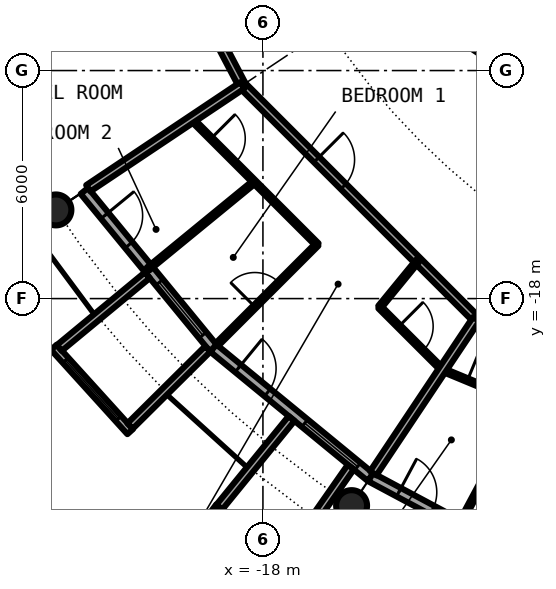
"""IFC4 building model, lengths in metres.
Left out: names, types, materials, properties, quantities, classifications, styles, units other than length and angle.
Written with IfcOpenShell. Run it as: python <this file> out.ifc"""

import sys

from ifc_helpers import new_model, si_unit, direction, frame, frame_2d, origin, origin_2d, place, context, subcontext, project, spatial, rectangle, circle, hollow_circle, extrude, element, fill, save


model = new_model("IFC4")
c1 = context("Model", 3, precision=1e-05, world=origin(), true_north=direction((0.0, 1.0)))
c2 = subcontext(c1, "Body", "Model", "MODEL_VIEW")
j1 = project(units=[si_unit("LENGTHUNIT", "METRE"), si_unit("PLANEANGLEUNIT", "RADIAN")], contexts=[c1])
p1 = place(None, origin())
s1 = spatial("IfcSite", under=j1, at=p1, CompositionType="ELEMENT")
p2 = place(p1, origin())
s2 = spatial("IfcBuilding", under=s1, at=p2, CompositionType="ELEMENT")
p3 = place(p2, frame((0.0, 0.0, 212.7)))
s3 = spatial("IfcBuildingStorey", under=s2, at=p3, CompositionType="ELEMENT", Elevation=212.7)
for number, where, z_axis, x_axis in (
    (1, (-23.448, -15.667, 0.0), (0.0, 0.0, 1.0), (1.0, 0.0, 0.0)),
    (2, (-15.667, -23.448, 0.0), (0.0, 0.0, 1.0), (1.0, 0.0, 0.0)),
):
    element("IfcColumn", number, at=place(p3, frame(where, z_axis=z_axis, x_axis=x_axis)), inside=s3, PredefinedType="COLUMN", context=c2, shape_type="SweptSolid", body=[
        extrude(hollow_circle(Radius=0.406, WallThickness=0.03, at=origin_2d()), origin(), (0.0, 0.0, 1.0), 3.05),
    ])
p4 = place(p3, frame((-22.699, -15.167, 0.0), z_axis=(0.0, 0.0, 1.0), x_axis=(0.634382322723, -0.773019449054, 0.0)))
e3 = element("IfcWall", 3, at=p4, inside=s3, PredefinedType="SOLIDWALL", context=c2, shape_type="SweptSolid", body=[
    extrude(rectangle(XDim=5.352, YDim=0.25, at=frame_2d((2.676, 0.0))), origin(), (0.0, 0.0, 1.0), 2.7),
])
p5 = place(p4, frame((0.841, 0.0, 0.0)))
e4 = element("IfcOpeningElement", 4, at=p5, cuts=e3, PredefinedType="OPENING", context=c2, shape_type="SweptSolid", body=[
    extrude(rectangle(XDim=1.0, YDim=2.2, at=frame_2d((0.5, 1.1))), frame((0.0, 0.135, 0.0), z_axis=(0.0, -1.0, 0.0), x_axis=(1.0, 0.0, 0.0)), (0.0, 0.0, 1.0), 0.27),
])
p6 = place(p4, frame((3.111, 0.0, 0.3)))
e5 = element("IfcOpeningElement", 5, at=p6, cuts=e3, PredefinedType="OPENING", context=c2, shape_type="SweptSolid", body=[
    extrude(rectangle(XDim=1.8, YDim=2.1, at=frame_2d((0.9, 1.05))), frame((0.0, 0.135, 0.0), z_axis=(0.0, -1.0, 0.0), x_axis=(1.0, 0.0, 0.0)), (0.0, 0.0, 1.0), 0.27),
])
p7 = place(p3, frame((-23.503, -19.282, -0.03), z_axis=(0.0, 0.0, 1.0), x_axis=(0.671506829416, -0.740998365753, 0.0)))
e6 = element("IfcWall", 6, at=p7, inside=s3, PredefinedType="SOLIDWALL", context=c2, shape_type="SweptSolid", body=[
    extrude(rectangle(XDim=2.993, YDim=0.2, at=frame_2d((1.497, 0.0))), origin(), (0.0, 0.0, 1.0), 2.73),
])
p8 = place(p7, frame((0.457, 0.0, 0.33)))
e7 = element("IfcOpeningElement", 7, at=p8, cuts=e6, PredefinedType="OPENING", context=c2, shape_type="SweptSolid", body=[
    extrude(circle(Radius=1.04, at=frame_2d((1.04, 1.04))), frame((0.0, 0.11, 0.0), z_axis=(0.0, -1.0, 0.0), x_axis=(1.0, 0.0, 0.0)), (0.0, 0.0, 1.0), 0.22),
])
p9 = place(p3, frame((-21.041, -17.384, -0.03), z_axis=(0.0, 0.0, 1.0), x_axis=(-0.770784861449, -0.63709551667, 0.0)))
e8 = element("IfcWall", 8, at=p9, inside=s3, PredefinedType="SOLIDWALL", context=c2, shape_type="SweptSolid", body=[
    extrude(rectangle(XDim=3.006, YDim=0.2, at=frame_2d((1.503, 0.0))), origin(), (0.0, 0.0, 1.0), 2.73),
])
p10 = place(p3, frame((-19.45, -19.323, -0.03), z_axis=(0.0, 0.0, 1.0), x_axis=(-0.709727076896, -0.704476739375, 0.0)))
e9 = element("IfcWall", 9, at=p10, inside=s3, PredefinedType="SOLIDWALL", context=c2, shape_type="SweptSolid", body=[
    extrude(rectangle(XDim=2.883, YDim=0.2, at=frame_2d((1.441, 0.0))), origin(), (0.0, 0.0, 1.0), 2.73),
])
p11 = place(p3, frame((-19.304, -19.304, 0.0), z_axis=(0.0, 0.0, 1.0), x_axis=(0.773019449054, -0.634382322723, 0.0)))
e10 = element("IfcWall", 10, at=p11, inside=s3, PredefinedType="SOLIDWALL", context=c2, shape_type="SweptSolid", body=[
    extrude(rectangle(XDim=5.352, YDim=0.25, at=frame_2d((2.676, 0.0))), origin(), (0.0, 0.0, 1.0), 2.7),
])
p12 = place(p11, frame((0.841, 0.0, 0.0)))
e11 = element("IfcOpeningElement", 11, at=p12, cuts=e10, PredefinedType="OPENING", context=c2, shape_type="SweptSolid", body=[
    extrude(rectangle(XDim=1.0, YDim=2.2, at=frame_2d((0.5, 1.1))), frame((0.0, 0.135, 0.0), z_axis=(0.0, -1.0, 0.0), x_axis=(1.0, 0.0, 0.0)), (0.0, 0.0, 1.0), 0.27),
])
p13 = place(p11, frame((3.111, 0.0, 0.3)))
e12 = element("IfcOpeningElement", 12, at=p13, cuts=e10, PredefinedType="OPENING", context=c2, shape_type="SweptSolid", body=[
    extrude(rectangle(XDim=1.8, YDim=2.1, at=frame_2d((0.9, 1.05))), frame((0.0, 0.135, 0.0), z_axis=(0.0, -1.0, 0.0), x_axis=(1.0, 0.0, 0.0)), (0.0, 0.0, 1.0), 0.27),
])
p14 = place(p3, frame((-19.289, -23.497, -0.03), z_axis=(0.0, 0.0, 1.0), x_axis=(0.797887588059, -0.602806268067, 0.0)))
e13 = element("IfcWall", 13, at=p14, inside=s3, PredefinedType="SOLIDWALL", context=c2, shape_type="SweptSolid", body=[
    extrude(rectangle(XDim=2.447, YDim=0.2, at=frame_2d((1.223, 0.0))), origin(), (0.0, 0.0, 1.0), 2.73),
])
p15 = place(p14, frame((0.183, 0.0, 0.33)))
e14 = element("IfcOpeningElement", 14, at=p15, cuts=e13, PredefinedType="OPENING", context=c2, shape_type="SweptSolid", body=[
    extrude(circle(Radius=1.04, at=frame_2d((1.04, 1.04))), frame((0.0, 0.11, 0.0), z_axis=(0.0, -1.0, 0.0), x_axis=(1.0, 0.0, 0.0)), (0.0, 0.0, 1.0), 0.22),
])
p16 = place(p3, frame((-17.246, -21.155, -0.03), z_axis=(0.0, 0.0, 1.0), x_axis=(-0.631741648902, -0.775179004516, 0.0)))
e15 = element("IfcWall", 15, at=p16, inside=s3, PredefinedType="SOLIDWALL", context=c2, shape_type="SweptSolid", body=[
    extrude(rectangle(XDim=3.006, YDim=0.2, at=frame_2d((1.503, 0.0))), origin(), (0.0, 0.0, 1.0), 2.73),
])
p17 = place(p3, frame((-15.688, -22.433, -0.03), z_axis=(0.0, 0.0, 1.0), x_axis=(-0.573260687834, -0.819373043115, 0.0)))
e16 = element("IfcWall", 16, at=p17, inside=s3, PredefinedType="SOLIDWALL", context=c2, shape_type="SweptSolid", body=[
    extrude(rectangle(XDim=2.925, YDim=0.2, at=frame_2d((1.463, 0.0))), origin(), (0.0, 0.0, 1.0), 2.73),
])
p18 = place(p3, frame((-15.167, -22.699, 0.0), z_axis=(0.0, 0.0, 1.0), x_axis=(0.881915646801, -0.471407246368, 0.0)))
e17 = element("IfcWall", 17, at=p18, inside=s3, PredefinedType="SOLIDWALL", context=c2, shape_type="SweptSolid", body=[
    extrude(rectangle(XDim=5.352, YDim=0.25, at=frame_2d((2.676, 0.0))), origin(), (0.0, 0.0, 1.0), 2.7),
])
p19 = place(p18, frame((0.841, 0.0, 0.0)))
e18 = element("IfcOpeningElement", 18, at=p19, cuts=e17, PredefinedType="OPENING", context=c2, shape_type="SweptSolid", body=[
    extrude(rectangle(XDim=1.0, YDim=2.2, at=frame_2d((0.5, 1.1))), frame((0.0, 0.135, 0.0), z_axis=(0.0, -1.0, 0.0), x_axis=(1.0, 0.0, 0.0)), (0.0, 0.0, 1.0), 0.27),
])
p20 = place(p18, frame((3.111, 0.0, 0.3)))
e19 = element("IfcOpeningElement", 19, at=p20, cuts=e17, PredefinedType="OPENING", context=c2, shape_type="SweptSolid", body=[
    extrude(rectangle(XDim=1.8, YDim=2.1, at=frame_2d((0.9, 1.05))), frame((0.0, 0.135, 0.0), z_axis=(0.0, -1.0, 0.0), x_axis=(1.0, 0.0, 0.0)), (0.0, 0.0, 1.0), 0.27),
])
p21 = place(p3, frame((-19.869, -13.285, 0.0), z_axis=(0.0, 0.0, 1.0), x_axis=(0.707290020325, -0.706923494552, 0.0)))
e20 = element("IfcWall", 20, at=p21, inside=s3, PredefinedType="PARTITIONING", context=c2, shape_type="SweptSolid", body=[
    extrude(rectangle(XDim=4.663, YDim=0.1, at=frame_2d((2.331, 0.0))), origin(), (0.0, 0.0, 1.0), 2.7),
])
p22 = place(p21, frame((0.712, 0.0, 0.0)))
e21 = element("IfcOpeningElement", 21, at=p22, cuts=e20, PredefinedType="OPENING", context=c2, shape_type="SweptSolid", body=[
    extrude(rectangle(XDim=0.9, YDim=2.3, at=frame_2d((0.45, 1.15))), frame((0.0, 0.06, 0.0), z_axis=(0.0, -1.0, 0.0), x_axis=(1.0, 0.0, 0.0)), (0.0, 0.0, 1.0), 0.12),
])
p23 = place(p3, frame((-14.927, -18.224, 0.0), z_axis=(0.0, 0.0, 1.0), x_axis=(0.707316201218, -0.706897299114, 0.0)))
e22 = element("IfcWall", 22, at=p23, inside=s3, PredefinedType="PARTITIONING", context=c2, shape_type="SweptSolid", body=[
    extrude(rectangle(XDim=2.331, YDim=0.1, at=frame_2d((1.166, 0.0))), origin(), (0.0, 0.0, 1.0), 2.7),
])
p24 = place(p23, frame((0.716, 0.0, 0.0)))
e23 = element("IfcOpeningElement", 23, at=p24, cuts=e22, PredefinedType="OPENING", context=c2, shape_type="SweptSolid", body=[
    extrude(rectangle(XDim=0.9, YDim=2.3, at=frame_2d((0.45, 1.15))), frame((0.0, 0.06, 0.0), z_axis=(0.0, -1.0, 0.0), x_axis=(1.0, 0.0, 0.0)), (0.0, 0.0, 1.0), 0.12),
])
p25 = place(p3, frame((-13.278, -19.873, 0.0), z_axis=(0.0, 0.0, 1.0), x_axis=(0.923920484476, -0.38258455061, 0.0)))
e24 = element("IfcWall", 24, at=p25, inside=s3, PredefinedType="PARTITIONING", context=c2, shape_type="SweptSolid", body=[
    extrude(rectangle(XDim=4.663, YDim=0.1, at=frame_2d((2.332, 0.0))), origin(), (0.0, 0.0, 1.0), 2.7),
])
p26 = place(p25, frame((0.715, 0.0, 0.0)))
e25 = element("IfcOpeningElement", 25, at=p26, cuts=e24, PredefinedType="OPENING", context=c2, shape_type="SweptSolid", body=[
    extrude(rectangle(XDim=0.9, YDim=2.3, at=frame_2d((0.45, 1.15))), frame((0.0, 0.06, 0.0), z_axis=(0.0, -1.0, 0.0), x_axis=(1.0, 0.0, 0.0)), (0.0, 0.0, 1.0), 0.12),
])
p27 = place(p3, frame((-19.317, -10.915, 0.0), z_axis=(0.0, 0.0, 1.0), x_axis=(0.465359652486, -0.885121683068, 0.0)))
e26 = element("IfcWall", 26, at=p27, inside=s3, PredefinedType="PARTITIONING", context=c2, shape_type="SweptSolid", body=[
    extrude(rectangle(XDim=1.665, YDim=0.2, at=frame_2d((0.833, 0.0))), origin(), (0.0, 0.0, 1.0), 2.7),
])
p28 = place(p3, frame((-18.542, -12.389, 0.0), z_axis=(0.0, 0.0, 1.0), x_axis=(0.707106781187, -0.707106781187, 0.0)))
e27 = element("IfcWall", 27, at=p28, inside=s3, PredefinedType="PARTITIONING", context=c2, shape_type="SweptSolid", body=[
    extrude(rectangle(XDim=8.702, YDim=0.2, at=frame_2d((4.351, 0.0))), origin(), (0.0, 0.0, 1.0), 2.7),
])
p29 = place(p28, frame((2.763, 0.0, 0.0)))
e28 = element("IfcOpeningElement", 28, at=p29, cuts=e27, PredefinedType="OPENING", context=c2, shape_type="SweptSolid", body=[
    extrude(rectangle(XDim=1.0, YDim=2.3, at=frame_2d((0.5, 1.15))), frame((0.0, 0.11, 0.0), z_axis=(0.0, -1.0, 0.0), x_axis=(1.0, 0.0, 0.0)), (0.0, 0.0, 1.0), 0.22),
])
p30 = place(p3, frame((-12.389, -18.542, 0.0), z_axis=(0.0, 0.0, 1.0), x_axis=(0.923867858178, -0.382711615483, 0.0)))
e29 = element("IfcWall", 29, at=p30, inside=s3, PredefinedType="PARTITIONING", context=c2, shape_type="SweptSolid", body=[
    extrude(rectangle(XDim=8.709, YDim=0.2, at=frame_2d((4.354, 0.0))), origin(), (0.0, 0.0, 1.0), 2.7),
])
p31 = place(p30, frame((2.763, 0.0, 0.0)))
e30 = element("IfcOpeningElement", 30, at=p31, cuts=e29, PredefinedType="OPENING", context=c2, shape_type="SweptSolid", body=[
    extrude(rectangle(XDim=1.0, YDim=2.3, at=frame_2d((0.5, 1.15))), frame((0.0, 0.11, 0.0), z_axis=(0.0, -1.0, 0.0), x_axis=(1.0, 0.0, 0.0)), (0.0, 0.0, 1.0), 0.22),
])
p32 = place(p3, frame((-14.717, -9.834, 0.0), z_axis=(0.0, 0.0, 1.0), x_axis=(0.831492679744, -0.555535708603, 0.0)))
e31 = element("IfcWall", 31, at=p32, inside=s3, PredefinedType="PARTITIONING", context=c2, shape_type="SweptSolid", body=[
    extrude(rectangle(XDim=13.549, YDim=0.2, at=frame_2d((6.775, 0.0))), origin(), (0.0, 0.0, 1.0), 2.7),
])
p33 = place(p32, frame((7.966, 0.0, 0.0)))
e32 = element("IfcOpeningElement", 32, at=p33, cuts=e31, PredefinedType="OPENING", context=c2, shape_type="SweptSolid", body=[
    extrude(rectangle(XDim=1.0, YDim=2.3, at=frame_2d((0.5, 1.15))), frame((0.0, 0.11, 0.0), z_axis=(0.0, -1.0, 0.0), x_axis=(1.0, 0.0, 0.0)), (0.0, 0.0, 1.0), 0.22),
])
p34 = place(p3, frame((-14.927, -18.224, 0.0), z_axis=(0.0, 0.0, 1.0), x_axis=(0.633861186344, 0.773446828454, 0.0)))
e33 = element("IfcWall", 33, at=p34, inside=s3, PredefinedType="PARTITIONING", context=c2, shape_type="SweptSolid", body=[
    extrude(rectangle(XDim=1.578, YDim=0.1, at=frame_2d((0.789, 0.0))), origin(), (0.0, 0.0, 1.0), 2.7),
])
p35 = place(p3, frame((-22.595, -15.098, 0.0), z_axis=(0.0, 0.0, 1.0), x_axis=(0.831387096605, 0.55569370664, 0.0)))
e34 = element("IfcWall", 34, at=p35, inside=s3, PredefinedType="PARTITIONING", context=c2, shape_type="SweptSolid", body=[
    extrude(rectangle(XDim=4.875, YDim=0.2, at=frame_2d((2.438, 0.0))), origin(), (0.0, 0.0, 1.0), 2.7),
])
p36 = place(p3, frame((-21.023, -17.22, 0.0), z_axis=(0.0, 0.0, 1.0), x_axis=(0.773548271597, 0.633737383709, 0.0)))
e35 = element("IfcWall", 35, at=p36, inside=s3, PredefinedType="PARTITIONING", context=c2, shape_type="SweptSolid", body=[
    extrude(rectangle(XDim=3.618, YDim=0.1, at=frame_2d((1.809, 0.0))), origin(), (0.0, 0.0, 1.0), 2.7),
])
p37 = place(p3, frame((-19.216, -19.216, 0.0), z_axis=(0.0, 0.0, 1.0), x_axis=(0.707106781187, 0.707106781187, 0.0)))
e36 = element("IfcWall", 36, at=p37, inside=s3, PredefinedType="PARTITIONING", context=c2, shape_type="SweptSolid", body=[
    extrude(rectangle(XDim=3.735, YDim=0.1, at=frame_2d((1.868, 0.0))), origin(), (0.0, 0.0, 1.0), 2.7),
])
p38 = place(p37, frame((1.417, 0.0, 0.0)))
e37 = element("IfcOpeningElement", 37, at=p38, cuts=e36, PredefinedType="OPENING", context=c2, shape_type="SweptSolid", body=[
    extrude(rectangle(XDim=0.9, YDim=2.3, at=frame_2d((0.45, 1.15))), frame((0.0, 0.06, 0.0), z_axis=(0.0, -1.0, 0.0), x_axis=(1.0, 0.0, 0.0)), (0.0, 0.0, 1.0), 0.12),
])
p39 = place(p3, frame((-15.097, -22.596, 0.0), z_axis=(0.0, 0.0, 1.0), x_axis=(0.555462686211, 0.831541462723, 0.0)))
e38 = element("IfcWall", 38, at=p39, inside=s3, PredefinedType="PARTITIONING", context=c2, shape_type="SweptSolid", body=[
    extrude(rectangle(XDim=4.875, YDim=0.2, at=frame_2d((2.438, 0.0))), origin(), (0.0, 0.0, 1.0), 2.7),
])
p40 = place(p3, frame((-12.833, -23.954, 0.0), z_axis=(0.0, 0.0, 1.0), x_axis=(0.472212052488, 0.881484984265, 0.0)))
e39 = element("IfcWall", 39, at=p40, inside=s3, PredefinedType="PARTITIONING", context=c2, shape_type="SweptSolid", body=[
    extrude(rectangle(XDim=3.619, YDim=0.1, at=frame_2d((1.81, 0.0))), origin(), (0.0, 0.0, 1.0), 2.7),
])
p41 = place(p5, origin())
e40 = element("IfcDoor", 40, at=p41, inside=s3, OperationType="SINGLE_SWING_LEFT", PredefinedType="DOOR", context=c2, shape_type="SweptSolid", body=[
    extrude(rectangle(XDim=1.0, YDim=2.2, at=frame_2d((0.5, 1.1))), frame((0.0, 0.025, 0.0), z_axis=(0.0, -1.0, 0.0), x_axis=(1.0, 0.0, 0.0)), (0.0, 0.0, 1.0), 0.05),
])
fill(e4, e40)
p42 = place(p6, origin())
e41 = element("IfcWindow", 41, at=p42, inside=s3, PartitioningType="SINGLE_PANEL", PredefinedType="WINDOW", context=c2, shape_type="SweptSolid", body=[
    extrude(rectangle(XDim=1.8, YDim=2.1, at=frame_2d((0.9, 1.05))), frame((0.0, 0.03, 0.0), z_axis=(0.0, -1.0, 0.0), x_axis=(1.0, 0.0, 0.0)), (0.0, 0.0, 1.0), 0.06),
])
fill(e5, e41)
p43 = place(p8, origin())
e42 = element("IfcWindow", 42, at=p43, inside=s3, PartitioningType="SINGLE_PANEL", PredefinedType="WINDOW", context=c2, shape_type="SweptSolid", body=[
    extrude(circle(Radius=1.04, at=frame_2d((1.04, 1.04))), frame((0.0, 0.03, 0.0), z_axis=(0.0, -1.0, 0.0), x_axis=(1.0, 0.0, 0.0)), (0.0, 0.0, 1.0), 0.06),
])
fill(e7, e42)
p44 = place(p12, origin())
e43 = element("IfcDoor", 43, at=p44, inside=s3, OperationType="SINGLE_SWING_LEFT", PredefinedType="DOOR", context=c2, shape_type="SweptSolid", body=[
    extrude(rectangle(XDim=1.0, YDim=2.2, at=frame_2d((0.5, 1.1))), frame((0.0, 0.025, 0.0), z_axis=(0.0, -1.0, 0.0), x_axis=(1.0, 0.0, 0.0)), (0.0, 0.0, 1.0), 0.05),
])
fill(e11, e43)
p45 = place(p13, origin())
e44 = element("IfcWindow", 44, at=p45, inside=s3, PartitioningType="SINGLE_PANEL", PredefinedType="WINDOW", context=c2, shape_type="SweptSolid", body=[
    extrude(rectangle(XDim=1.8, YDim=2.1, at=frame_2d((0.9, 1.05))), frame((0.0, 0.03, 0.0), z_axis=(0.0, -1.0, 0.0), x_axis=(1.0, 0.0, 0.0)), (0.0, 0.0, 1.0), 0.06),
])
fill(e12, e44)
p46 = place(p19, origin())
e45 = element("IfcDoor", 45, at=p46, inside=s3, OperationType="SINGLE_SWING_LEFT", PredefinedType="DOOR", context=c2, shape_type="SweptSolid", body=[
    extrude(rectangle(XDim=1.0, YDim=2.2, at=frame_2d((0.5, 1.1))), frame((0.0, 0.025, 0.0), z_axis=(0.0, -1.0, 0.0), x_axis=(1.0, 0.0, 0.0)), (0.0, 0.0, 1.0), 0.05),
])
fill(e18, e45)
p47 = place(p29, origin())
e46 = element("IfcDoor", 46, at=p47, inside=s3, OperationType="SINGLE_SWING_LEFT", PredefinedType="DOOR", context=c2, shape_type="SweptSolid", body=[
    extrude(rectangle(XDim=1.0, YDim=2.3, at=frame_2d((0.5, 1.15))), frame((0.0, 0.025, 0.0), z_axis=(0.0, -1.0, 0.0), x_axis=(1.0, 0.0, 0.0)), (0.0, 0.0, 1.0), 0.05),
])
fill(e28, e46)
p48 = place(p24, origin())
e47 = element("IfcDoor", 47, at=p48, inside=s3, OperationType="SINGLE_SWING_LEFT", PredefinedType="DOOR", context=c2, shape_type="SweptSolid", body=[
    extrude(rectangle(XDim=0.9, YDim=2.3, at=frame_2d((0.45, 1.15))), frame((0.0, 0.025, 0.0), z_axis=(0.0, -1.0, 0.0), x_axis=(1.0, 0.0, 0.0)), (0.0, 0.0, 1.0), 0.05),
])
fill(e23, e47)
p49 = place(p38, origin())
e48 = element("IfcDoor", 48, at=p49, inside=s3, OperationType="SINGLE_SWING_LEFT", PredefinedType="DOOR", context=c2, shape_type="SweptSolid", body=[
    extrude(rectangle(XDim=0.9, YDim=2.3, at=frame_2d((0.45, 1.15))), frame((0.0, 0.025, 0.0), z_axis=(0.0, -1.0, 0.0), x_axis=(1.0, 0.0, 0.0)), (0.0, 0.0, 1.0), 0.05),
])
fill(e37, e48)
p50 = place(p22, origin())
e49 = element("IfcDoor", 49, at=p50, inside=s3, OperationType="SINGLE_SWING_LEFT", PredefinedType="DOOR", context=c2, shape_type="SweptSolid", body=[
    extrude(rectangle(XDim=0.9, YDim=2.3, at=frame_2d((0.45, 1.15))), frame((0.0, 0.025, 0.0), z_axis=(0.0, -1.0, 0.0), x_axis=(1.0, 0.0, 0.0)), (0.0, 0.0, 1.0), 0.05),
])
fill(e21, e49)
p51 = place(p26, origin())
e50 = element("IfcDoor", 50, at=p51, inside=s3, OperationType="SINGLE_SWING_LEFT", PredefinedType="DOOR", context=c2, shape_type="SweptSolid", body=[
    extrude(rectangle(XDim=0.9, YDim=2.3, at=frame_2d((0.45, 1.15))), frame((0.0, 0.025, 0.0), z_axis=(0.0, -1.0, 0.0), x_axis=(1.0, 0.0, 0.0)), (0.0, 0.0, 1.0), 0.05),
])
fill(e25, e50)
save(model, sys.argv[1])
